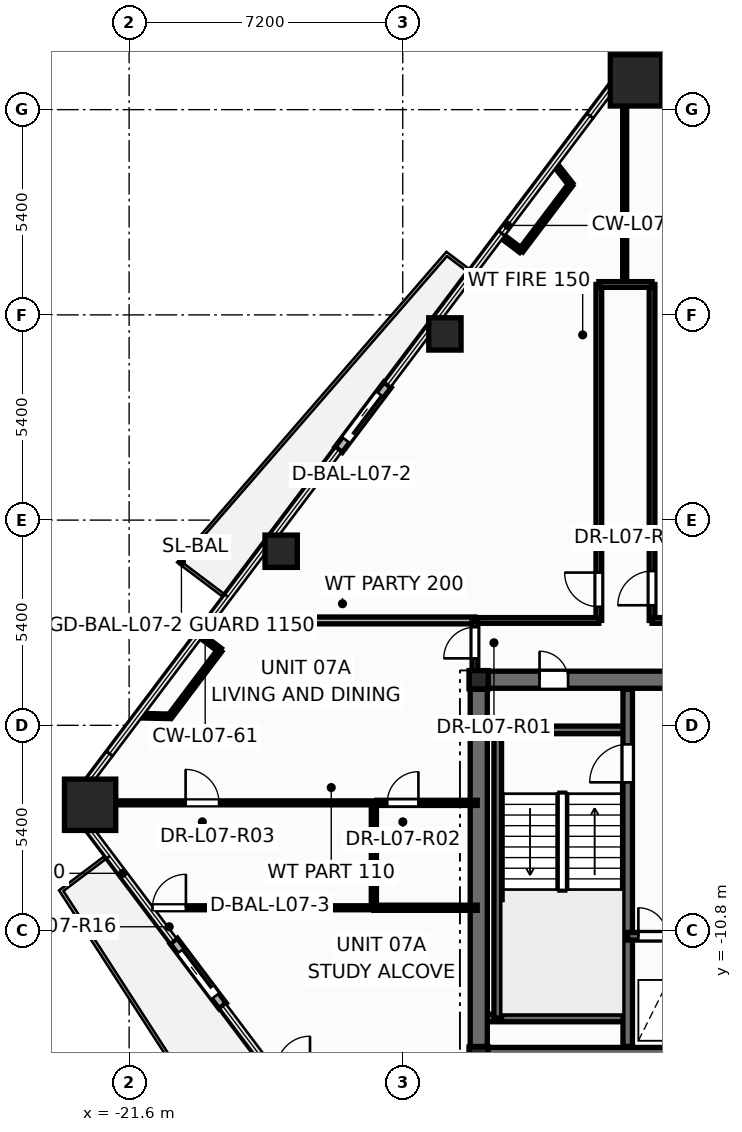
"""IFC4 building model, lengths in metres.
Left out: names, types, materials, properties, quantities, classifications, styles, units other than length and angle.
Written with IfcOpenShell. Run it as: python <this file> out.ifc"""

import sys

from ifc_helpers import new_model, si_unit, direction, frame, frame_2d, origin, origin_2d, place, context, subcontext, project, spatial, rectangle, hollow_rectangle, hollow_circle, i_section, extrude, element, fill, save


model = new_model("IFC4")
c1 = context("Model", 3, precision=1e-05, world=origin(), true_north=direction((0.0, 1.0)))
c2 = subcontext(c1, "Body", "Model", "MODEL_VIEW")
j1 = project(units=[si_unit("LENGTHUNIT", "METRE"), si_unit("PLANEANGLEUNIT", "RADIAN")], contexts=[c1])
p1 = place(None, origin())
s1 = spatial("IfcSite", under=j1, at=p1, CompositionType="ELEMENT")
p2 = place(p1, origin())
s2 = spatial("IfcBuilding", under=s1, at=p2, CompositionType="ELEMENT")
p3 = place(p2, frame((0.0, 0.0, 31.5)))
s3 = spatial("IfcBuildingStorey", under=s2, at=p3, CompositionType="ELEMENT", Elevation=31.5)
for number, where, z_axis, x_axis in (
    (1, (-22.626, -7.49, 0.0), (0.0, 0.0, 1.0), (1.0, 0.0, 0.0)),
    (2, (-8.263, 11.57, 0.0), (0.0, 0.0, 1.0), (1.0, 0.0, 0.0)),
):
    element("IfcColumn", number, at=place(p3, frame(where, z_axis=z_axis, x_axis=x_axis)), inside=s3, PredefinedType="COLUMN", context=c2, shape_type="SweptSolid", body=[
        extrude(hollow_rectangle(XDim=1.35, YDim=1.35, WallThickness=0.065, at=origin_2d()), origin(), (0.0, 0.0, 1.0), 3.6),
    ])
for number, where, z_axis, x_axis in (
    (3, (-13.29, 4.899, 0.0), (0.0, 0.0, 1.0), (1.0, 0.0, 0.0)),
    (4, (-17.599, -0.819, 0.0), (0.0, 0.0, 1.0), (1.0, 0.0, 0.0)),
):
    element("IfcColumn", number, at=place(p3, frame(where, z_axis=z_axis, x_axis=x_axis)), inside=s3, PredefinedType="COLUMN", context=c2, shape_type="SweptSolid", body=[
        extrude(hollow_circle(Radius=0.425, WallThickness=0.038, at=origin_2d()), origin(), (0.0, 0.0, 1.0), 3.6),
    ])
for number, where, z_axis, x_axis in (
    (5, (-12.4, -14.1, 0.0), (0.0, 0.0, 1.0), (1.0, 0.0, 0.0)),
    (6, (-12.4, -4.2, 0.0), (0.0, 0.0, 1.0), (1.0, 0.0, 0.0)),
):
    element("IfcColumn", number, at=place(p3, frame(where, z_axis=z_axis, x_axis=x_axis)), inside=s3, PredefinedType="COLUMN", context=c2, shape_type="SweptSolid", body=[
        extrude(i_section(OverallWidth=0.5, OverallDepth=0.482, WebThickness=0.04, FlangeThickness=0.045, at=origin_2d()), origin(), (0.0, 0.0, 1.0), 3.6),
    ])
p4 = place(p3, frame((-14.8, 3.561, -0.015), z_axis=(0.0, 0.0, 1.0), x_axis=(-0.601823875366, -0.798628839349, 0.0)))
e7 = element("IfcWall", 7, at=p4, inside=s3, PredefinedType="STANDARD", context=c2, shape_type="SweptSolid", body=[
    extrude(rectangle(XDim=2.14, YDim=0.24, at=frame_2d((1.07, 0.0))), origin(), (0.0, 0.0, 1.0), 2.728),
])
p5 = place(p4, frame((0.32, 0.0, 0.015)))
e8 = element("IfcOpeningElement", 8, at=p5, cuts=e7, PredefinedType="OPENING", context=c2, shape_type="SweptSolid", body=[
    extrude(rectangle(XDim=1.506, YDim=2.204, at=frame_2d((0.75, 1.102))), frame((0.0, 0.13, 0.0), z_axis=(0.0, -1.0, 0.0), x_axis=(1.0, 0.0, 0.0)), (0.0, 0.0, 1.0), 0.26),
])
p6 = place(p3, frame((-20.427, -11.073, -0.015), z_axis=(0.0, 0.0, 1.0), x_axis=(0.601769043502, -0.798670156124, 0.0)))
e9 = element("IfcWall", 9, at=p6, inside=s3, PredefinedType="STANDARD", context=c2, shape_type="SweptSolid", body=[
    extrude(rectangle(XDim=2.14, YDim=0.24, at=frame_2d((1.07, 0.0))), origin(), (0.0, 0.0, 1.0), 2.728),
])
p7 = place(p6, frame((0.32, 0.0, 0.015)))
e10 = element("IfcOpeningElement", 10, at=p7, cuts=e9, PredefinedType="OPENING", context=c2, shape_type="SweptSolid", body=[
    extrude(rectangle(XDim=1.506, YDim=2.204, at=frame_2d((0.75, 1.102))), frame((0.0, 0.13, 0.0), z_axis=(0.0, -1.0, 0.0), x_axis=(1.0, 0.0, 0.0)), (0.0, 0.0, 1.0), 0.26),
])
p8 = place(p3, frame((-12.65, -14.1, 0.0), z_axis=(0.0, 0.0, 1.0), x_axis=(1.0, 0.0, 0.0)))
e11 = element("IfcWall", 11, at=p8, inside=s3, PredefinedType="SHEAR", context=c2, shape_type="SweptSolid", body=[
    extrude(rectangle(XDim=25.3, YDim=0.45, at=frame_2d((12.65, 0.0))), origin(), (0.0, 0.0, 1.0), 3.6),
])
p9 = place(p3, frame((-12.65, -4.2, 0.0), z_axis=(0.0, 0.0, 1.0), x_axis=(1.0, 0.0, 0.0)))
e12 = element("IfcWall", 12, at=p9, inside=s3, PredefinedType="SHEAR", context=c2, shape_type="SweptSolid", body=[
    extrude(rectangle(XDim=25.3, YDim=0.45, at=frame_2d((12.65, 0.0))), origin(), (0.0, 0.0, 1.0), 3.6),
])
p10 = place(p9, frame((1.85, 0.0, 0.0)))
e13 = element("IfcOpeningElement", 13, at=p10, cuts=e12, PredefinedType="OPENING", context=c2, shape_type="SweptSolid", body=[
    extrude(rectangle(XDim=0.756, YDim=2.054, at=frame_2d((0.375, 1.027))), frame((0.0, 0.235, 0.0), z_axis=(0.0, -1.0, 0.0), x_axis=(1.0, 0.0, 0.0)), (0.0, 0.0, 1.0), 0.47),
])
p11 = place(p9, frame((21.85, 0.0, 0.0)))
e14 = element("IfcOpeningElement", 14, at=p11, cuts=e12, PredefinedType="OPENING", context=c2, shape_type="SweptSolid", body=[
    extrude(rectangle(XDim=0.756, YDim=2.054, at=frame_2d((0.375, 1.027))), frame((0.0, 0.235, 0.0), z_axis=(0.0, -1.0, 0.0), x_axis=(1.0, 0.0, 0.0)), (0.0, 0.0, 1.0), 0.47),
])
p12 = place(p9, frame((23.5, 0.0, 0.0)))
e15 = element("IfcOpeningElement", 15, at=p12, cuts=e12, PredefinedType="OPENING", context=c2, shape_type="SweptSolid", body=[
    extrude(rectangle(XDim=0.756, YDim=2.054, at=frame_2d((0.375, 1.027))), frame((0.0, 0.235, 0.0), z_axis=(0.0, -1.0, 0.0), x_axis=(1.0, 0.0, 0.0)), (0.0, 0.0, 1.0), 0.47),
])
p13 = place(p9, frame((5.85, 0.0, 0.0)))
e16 = element("IfcOpeningElement", 16, at=p13, cuts=e12, PredefinedType="OPENING", context=c2, shape_type="SweptSolid", body=[
    extrude(rectangle(XDim=1.006, YDim=2.104, at=frame_2d((0.5, 1.052))), frame((0.0, 0.235, 0.0), z_axis=(0.0, -1.0, 0.0), x_axis=(1.0, 0.0, 0.0)), (0.0, 0.0, 1.0), 0.47),
])
p14 = place(p9, frame((10.35, 0.0, 0.0)))
e17 = element("IfcOpeningElement", 17, at=p14, cuts=e12, PredefinedType="OPENING", context=c2, shape_type="SweptSolid", body=[
    extrude(rectangle(XDim=1.406, YDim=2.154, at=frame_2d((0.7, 1.077))), frame((0.0, 0.235, 0.0), z_axis=(0.0, -1.0, 0.0), x_axis=(1.0, 0.0, 0.0)), (0.0, 0.0, 1.0), 0.47),
])
p15 = place(p9, frame((18.45, 0.0, 0.0)))
e18 = element("IfcOpeningElement", 18, at=p15, cuts=e12, PredefinedType="OPENING", context=c2, shape_type="SweptSolid", body=[
    extrude(rectangle(XDim=1.006, YDim=2.104, at=frame_2d((0.5, 1.052))), frame((0.0, 0.235, 0.0), z_axis=(0.0, -1.0, 0.0), x_axis=(1.0, 0.0, 0.0)), (0.0, 0.0, 1.0), 0.47),
])
for number, where, z_axis, x_axis in (
    (19, (-12.35, -5.52, 0.0), (0.0, 0.0, 1.0), (1.0, 0.0, 0.0)),
    (20, (-12.35, -13.1, 0.0), (0.0, 0.0, 1.0), (1.0, 0.0, 0.0)),
):
    element("IfcWall", number, at=place(p3, frame(where, z_axis=z_axis, x_axis=x_axis)), inside=s3, PredefinedType="SOLIDWALL", context=c2, shape_type="SweptSolid", body=[
        extrude(rectangle(XDim=3.87, YDim=0.2, at=frame_2d((1.935, 0.0))), origin(), (0.0, 0.0, 1.0), 3.6),
    ])
p16 = place(p3, frame((-11.9, -13.1, 0.0), z_axis=(0.0, 0.0, 1.0), x_axis=(0.0, 1.0, 0.0)))
e21 = element("IfcWall", 21, at=p16, inside=s3, PredefinedType="SOLIDWALL", context=c2, shape_type="SweptSolid", body=[
    extrude(rectangle(XDim=7.58, YDim=0.2, at=frame_2d((3.79, 0.0))), origin(), (0.0, 0.0, 1.0), 3.6),
])
p17 = place(p3, frame((-8.48, -13.85, 0.0), z_axis=(0.0, 0.0, 1.0), x_axis=(0.0, 1.0, 0.0)))
e22 = element("IfcWall", 22, at=p17, inside=s3, PredefinedType="SHEAR", context=c2, shape_type="SweptSolid", body=[
    extrude(rectangle(XDim=9.4, YDim=0.25, at=frame_2d((4.7, 0.0))), origin(), (0.0, 0.0, 1.0), 3.6),
])
p18 = place(p17, frame((6.95, 0.0, 0.0)))
e23 = element("IfcOpeningElement", 23, at=p18, cuts=e22, PredefinedType="OPENING", context=c2, shape_type="SweptSolid", body=[
    extrude(rectangle(XDim=1.006, YDim=2.104, at=frame_2d((0.5, 1.052))), frame((0.0, 0.135, 0.0), z_axis=(0.0, -1.0, 0.0), x_axis=(1.0, 0.0, 0.0)), (0.0, 0.0, 1.0), 0.27),
])
p19 = place(p3, frame((-8.48, -10.95, 0.0), z_axis=(0.0, 0.0, 1.0), x_axis=(1.0, 0.0, 0.0)))
e24 = element("IfcWall", 24, at=p19, inside=s3, PredefinedType="SOLIDWALL", context=c2, shape_type="SweptSolid", body=[
    extrude(rectangle(XDim=3.36, YDim=0.2, at=frame_2d((1.68, 0.0))), origin(), (0.0, 0.0, 1.0), 3.6),
])
p20 = place(p19, frame((0.28, 0.0, 0.0)))
e25 = element("IfcOpeningElement", 25, at=p20, cuts=e24, PredefinedType="OPENING", context=c2, shape_type="SweptSolid", body=[
    extrude(rectangle(XDim=0.756, YDim=2.054, at=frame_2d((0.375, 1.027))), frame((0.0, 0.11, 0.0), z_axis=(0.0, -1.0, 0.0), x_axis=(1.0, 0.0, 0.0)), (0.0, 0.0, 1.0), 0.22),
])
p21 = place(p19, frame((1.85, 0.0, 0.0)))
e26 = element("IfcOpeningElement", 26, at=p21, cuts=e24, PredefinedType="OPENING", context=c2, shape_type="SweptSolid", body=[
    extrude(rectangle(XDim=1.106, YDim=2.104, at=frame_2d((0.55, 1.052))), frame((0.0, 0.11, 0.0), z_axis=(0.0, -1.0, 0.0), x_axis=(1.0, 0.0, 0.0)), (0.0, 0.0, 1.0), 0.22),
])
p22 = place(p3, frame((-12.4, -13.85, 0.0), z_axis=(0.0, 0.0, 1.0), x_axis=(0.0, 1.0, 0.0)))
e27 = element("IfcWall", 27, at=p22, inside=s3, PredefinedType="SHEAR", context=c2, shape_type="SweptSolid", body=[
    extrude(rectangle(XDim=9.4, YDim=0.45, at=frame_2d((4.7, 0.0))), origin(), (0.0, 0.0, 1.0), 3.6),
])
p23 = place(p3, frame((-9.24, -2.64, 0.0), z_axis=(0.0, 0.0, 1.0), x_axis=(0.0, 1.0, 0.0)))
e28 = element("IfcWall", 28, at=p23, inside=s3, PredefinedType="PARTITIONING", context=c2, shape_type="SweptSolid", body=[
    extrude(rectangle(XDim=8.84, YDim=0.15, at=frame_2d((4.42, 0.0))), origin(), (0.0, 0.0, 1.0), 2.509),
])
p24 = place(p23, frame((0.359, 0.0, 0.0)))
e29 = element("IfcOpeningElement", 29, at=p24, cuts=e28, PredefinedType="OPENING", context=c2, shape_type="SweptSolid", body=[
    extrude(rectangle(XDim=0.906, YDim=2.104, at=frame_2d((0.45, 1.052))), frame((0.0, 0.085, 0.0), z_axis=(0.0, -1.0, 0.0), x_axis=(1.0, 0.0, 0.0)), (0.0, 0.0, 1.0), 0.17),
])
p25 = place(p3, frame((-7.84, -2.64, 0.0), z_axis=(0.0, 0.0, 1.0), x_axis=(0.0, 1.0, 0.0)))
e30 = element("IfcWall", 30, at=p25, inside=s3, PredefinedType="PARTITIONING", context=c2, shape_type="SweptSolid", body=[
    extrude(rectangle(XDim=8.84, YDim=0.15, at=frame_2d((4.42, 0.0))), origin(), (0.0, 0.0, 1.0), 2.509),
])
p26 = place(p25, frame((0.399, 0.0, 0.0)))
e31 = element("IfcOpeningElement", 31, at=p26, cuts=e30, PredefinedType="OPENING", context=c2, shape_type="SweptSolid", body=[
    extrude(rectangle(XDim=0.906, YDim=2.104, at=frame_2d((0.45, 1.052))), frame((0.0, 0.085, 0.0), z_axis=(0.0, -1.0, 0.0), x_axis=(1.0, 0.0, 0.0)), (0.0, 0.0, 1.0), 0.17),
])
p27 = place(p3, frame((-23.089, -7.44, 0.0), z_axis=(0.0, 0.0, 1.0), x_axis=(1.0, 0.0, 0.0)))
e32 = element("IfcWall", 32, at=p27, inside=s3, PredefinedType="PARTITIONING", context=c2, shape_type="SweptSolid", body=[
    extrude(rectangle(XDim=8.009, YDim=0.105, at=frame_2d((4.005, 0.0))), origin(), (0.0, 0.0, 1.0), 2.325),
])
p28 = place(p27, frame((2.976, 0.0, 0.0)))
e33 = element("IfcOpeningElement", 33, at=p28, cuts=e32, PredefinedType="OPENING", context=c2, shape_type="SweptSolid", body=[
    extrude(rectangle(XDim=0.886, YDim=2.104, at=frame_2d((0.44, 1.052))), frame((0.0, 0.062, 0.0), z_axis=(0.0, -1.0, 0.0), x_axis=(1.0, 0.0, 0.0)), (0.0, 0.0, 1.0), 0.125),
])
p29 = place(p3, frame((-19.472, -2.64, 0.0), z_axis=(0.0, 0.0, 1.0), x_axis=(1.0, 0.0, 0.0)))
e34 = element("IfcWall", 34, at=p29, inside=s3, PredefinedType="PARTITIONING", context=c2, shape_type="SweptSolid", body=[
    extrude(rectangle(XDim=6.972, YDim=0.18, at=frame_2d((3.486, 0.0))), origin(), (0.0, 0.0, 1.0), 2.713),
])
p30 = place(p3, frame((-7.84, -2.64, 0.0), z_axis=(0.0, 0.0, 1.0), x_axis=(1.0, 0.0, 0.0)))
e35 = element("IfcWall", 35, at=p30, inside=s3, PredefinedType="PARTITIONING", context=c2, shape_type="SweptSolid", body=[
    extrude(rectangle(XDim=8.578, YDim=0.15, at=frame_2d((4.289, 0.0))), origin(), (0.0, 0.0, 1.0), 2.325),
])
p31 = place(p3, frame((-21.085, -10.2, 0.0), z_axis=(0.0, 0.0, 1.0), x_axis=(1.0, 0.0, 0.0)))
e36 = element("IfcWall", 36, at=p31, inside=s3, PredefinedType="PARTITIONING", context=c2, shape_type="SweptSolid", body=[
    extrude(rectangle(XDim=5.926, YDim=0.105, at=frame_2d((2.963, 0.0))), origin(), (0.0, 0.0, 1.0), 2.713),
])
p32 = place(p31, frame((0.1, 0.0, 0.0)))
e37 = element("IfcOpeningElement", 37, at=p32, cuts=e36, PredefinedType="OPENING", context=c2, shape_type="SweptSolid", body=[
    extrude(rectangle(XDim=0.886, YDim=2.104, at=frame_2d((0.44, 1.052))), frame((0.0, 0.062, 0.0), z_axis=(0.0, -1.0, 0.0), x_axis=(1.0, 0.0, 0.0)), (0.0, 0.0, 1.0), 0.125),
])
p33 = place(p3, frame((-8.56, 6.2, 0.0), z_axis=(0.0, 0.0, 1.0), x_axis=(0.0, 1.0, 0.0)))
e38 = element("IfcWall", 38, at=p33, inside=s3, PredefinedType="PARTITIONING", context=c2, shape_type="SweptSolid", body=[
    extrude(rectangle(XDim=5.641, YDim=0.105, at=frame_2d((2.821, 0.0))), origin(), (0.0, 0.0, 1.0), 2.509),
])
p34 = place(p3, frame((-12.5, -2.64, 0.0), z_axis=(0.0, 0.0, 1.0), x_axis=(1.0, 0.0, 0.0)))
e39 = element("IfcWall", 39, at=p34, inside=s3, PredefinedType="PARTITIONING", context=c2, shape_type="SweptSolid", body=[
    extrude(rectangle(XDim=3.26, YDim=0.15, at=frame_2d((1.63, 0.0))), origin(), (0.0, 0.0, 1.0), 3.35),
])
p35 = place(p3, frame((-15.078, -7.44, 0.0), z_axis=(0.0, 0.0, 1.0), x_axis=(1.0, 0.0, 0.0)))
e40 = element("IfcWall", 40, at=p35, inside=s3, PredefinedType="PARTITIONING", context=c2, shape_type="SweptSolid", body=[
    extrude(rectangle(XDim=2.638, YDim=0.135, at=frame_2d((1.319, 0.0))), origin(), (0.0, 0.0, 1.0), 2.713),
])
p36 = place(p35, frame((0.271, 0.0, 0.0)))
e41 = element("IfcOpeningElement", 41, at=p36, cuts=e40, PredefinedType="OPENING", context=c2, shape_type="SweptSolid", body=[
    extrude(rectangle(XDim=0.826, YDim=2.104, at=frame_2d((0.41, 1.052))), frame((0.0, 0.078, 0.0), z_axis=(0.0, -1.0, 0.0), x_axis=(1.0, 0.0, 0.0)), (0.0, 0.0, 1.0), 0.155),
])
p37 = place(p3, frame((-15.16, -10.2, 0.0), z_axis=(0.0, 0.0, 1.0), x_axis=(0.0, 1.0, 0.0)))
e42 = element("IfcWall", 42, at=p37, inside=s3, PredefinedType="PARTITIONING", context=c2, shape_type="SweptSolid", body=[
    extrude(rectangle(XDim=2.76, YDim=0.135, at=frame_2d((1.38, 0.0))), origin(), (0.0, 0.0, 1.0), 3.35),
])
p38 = place(p3, frame((-15.16, -10.2, 0.0), z_axis=(0.0, 0.0, 1.0), x_axis=(1.0, 0.0, 0.0)))
e43 = element("IfcWall", 43, at=p38, inside=s3, PredefinedType="PARTITIONING", context=c2, shape_type="SweptSolid", body=[
    extrude(rectangle(XDim=2.72, YDim=0.135, at=frame_2d((1.36, 0.0))), origin(), (0.0, 0.0, 1.0), 2.713),
])
for number, where, z_axis, x_axis in (
    (44, (-9.976, 8.833, 0.0), (0.0, 0.0, 1.0), (-0.602, -0.799, 0.0)),
    (45, (-19.21, -3.422, 0.0), (0.0, 0.0, 1.0), (-0.602, -0.799, 0.0)),
):
    element("IfcWall", number, at=place(p3, frame(where, z_axis=z_axis, x_axis=x_axis)), inside=s3, PredefinedType="PARTITIONING", context=c2, shape_type="SweptSolid", body=[
        extrude(rectangle(XDim=2.18, YDim=0.12, at=frame_2d((1.09, 0.0))), origin(), (0.0, 0.0, 1.0), 3.35),
    ])
p39 = place(p3, frame((-12.5, -4.24, 0.0), z_axis=(0.0, 0.0, 1.0), x_axis=(0.0, 1.0, 0.0)))
e46 = element("IfcWall", 46, at=p39, inside=s3, PredefinedType="PARTITIONING", context=c2, shape_type="SweptSolid", body=[
    extrude(rectangle(XDim=1.6, YDim=0.15, at=frame_2d((0.8, 0.0))), origin(), (0.0, 0.0, 1.0), 2.325),
])
p40 = place(p39, frame((0.602, 0.0, 0.0)))
e47 = element("IfcOpeningElement", 47, at=p40, cuts=e46, PredefinedType="OPENING", context=c2, shape_type="SweptSolid", body=[
    extrude(rectangle(XDim=0.826, YDim=2.104, at=frame_2d((0.41, 1.052))), frame((0.0, 0.085, 0.0), z_axis=(0.0, -1.0, 0.0), x_axis=(1.0, 0.0, 0.0)), (0.0, 0.0, 1.0), 0.17),
])
p41 = place(p3, frame((-20.522, -5.163, 0.0), z_axis=(0.0, 0.0, 1.0), x_axis=(-0.999785995621, 0.02068726565, 0.0)))
e48 = element("IfcWall", 48, at=p41, inside=s3, PredefinedType="PARTITIONING", context=c2, shape_type="SweptSolid", body=[
    extrude(rectangle(XDim=0.826, YDim=0.12, at=frame_2d((0.413, 0.0))), origin(), (0.0, 0.0, 1.0), 2.713),
])
p42 = place(p3, frame((-9.24, 6.2, 0.0), z_axis=(0.0, 0.0, 1.0), x_axis=(1.0, 0.0, 0.0)))
e49 = element("IfcWall", 49, at=p42, inside=s3, PredefinedType="PARTITIONING", context=c2, shape_type="SweptSolid", body=[
    extrude(rectangle(XDim=1.4, YDim=0.15, at=frame_2d((0.7, 0.0))), origin(), (0.0, 0.0, 1.0), 3.35),
])
p43 = place(p3, frame((-10.404, 9.377, 0.0), z_axis=(0.0, 0.0, 1.0), x_axis=(0.618661415425, -0.785657720044, 0.0)))
e50 = element("IfcWall", 50, at=p43, inside=s3, PredefinedType="PARTITIONING", context=c2, shape_type="SweptSolid", body=[
    extrude(rectangle(XDim=0.693, YDim=0.12, at=frame_2d((0.346, 0.0))), origin(), (0.0, 0.0, 1.0), 2.713),
])
p44 = place(p3, frame((-11.287, 7.092, 0.0), z_axis=(0.0, 0.0, 1.0), x_axis=(-0.798773936271, 0.601631281379, 0.0)))
e51 = element("IfcWall", 51, at=p44, inside=s3, PredefinedType="PARTITIONING", context=c2, shape_type="SweptSolid", body=[
    extrude(rectangle(XDim=0.67, YDim=0.12, at=frame_2d((0.335, 0.0))), origin(), (0.0, 0.0, 1.0), 2.713),
])
p45 = place(p3, frame((-19.745, -3.019, 0.0), z_axis=(0.0, 0.0, 1.0), x_axis=(0.798598820081, -0.601863709294, 0.0)))
e52 = element("IfcWall", 52, at=p45, inside=s3, PredefinedType="PARTITIONING", context=c2, shape_type="SweptSolid", body=[
    extrude(rectangle(XDim=0.67, YDim=0.12, at=frame_2d((0.335, 0.0))), origin(), (0.0, 0.0, 1.0), 2.713),
])
p46 = place(p5, origin())
e53 = element("IfcDoor", 53, at=p46, inside=s3, OperationType="SLIDING_TO_RIGHT", PredefinedType="DOOR", context=c2, shape_type="SweptSolid", body=[
    extrude(rectangle(XDim=1.5, YDim=2.2, at=frame_2d((0.75, 1.1))), frame((0.0, 0.025, 0.0), z_axis=(0.0, -1.0, 0.0), x_axis=(1.0, 0.0, 0.0)), (0.0, 0.0, 1.0), 0.05),
])
fill(e8, e53)
p47 = place(p7, origin())
e54 = element("IfcDoor", 54, at=p47, inside=s3, OperationType="SLIDING_TO_RIGHT", PredefinedType="DOOR", context=c2, shape_type="SweptSolid", body=[
    extrude(rectangle(XDim=1.5, YDim=2.2, at=frame_2d((0.75, 1.1))), frame((0.0, 0.025, 0.0), z_axis=(0.0, -1.0, 0.0), x_axis=(1.0, 0.0, 0.0)), (0.0, 0.0, 1.0), 0.05),
])
fill(e10, e54)
p48 = place(p18, origin())
e55 = element("IfcDoor", 55, at=p48, inside=s3, OperationType="SINGLE_SWING_LEFT", PredefinedType="DOOR", context=c2, shape_type="SweptSolid", body=[
    extrude(rectangle(XDim=1.0, YDim=2.1, at=frame_2d((0.5, 1.05))), frame((0.0, 0.025, 0.0), z_axis=(0.0, -1.0, 0.0), x_axis=(1.0, 0.0, 0.0)), (0.0, 0.0, 1.0), 0.05),
])
fill(e23, e55)
p49 = place(p20, origin())
e56 = element("IfcDoor", 56, at=p49, inside=s3, OperationType="SINGLE_SWING_LEFT", PredefinedType="DOOR", context=c2, shape_type="SweptSolid", body=[
    extrude(rectangle(XDim=0.75, YDim=2.05, at=frame_2d((0.375, 1.025))), frame((0.0, 0.025, 0.0), z_axis=(0.0, -1.0, 0.0), x_axis=(1.0, 0.0, 0.0)), (0.0, 0.0, 1.0), 0.05),
])
fill(e25, e56)
p50 = place(p10, origin())
e57 = element("IfcDoor", 57, at=p50, inside=s3, OperationType="SINGLE_SWING_LEFT", PredefinedType="DOOR", context=c2, shape_type="SweptSolid", body=[
    extrude(rectangle(XDim=0.75, YDim=2.05, at=frame_2d((0.375, 1.025))), frame((0.0, 0.025, 0.0), z_axis=(0.0, -1.0, 0.0), x_axis=(1.0, 0.0, 0.0)), (0.0, 0.0, 1.0), 0.05),
])
fill(e13, e57)
p51 = place(p40, origin())
e58 = element("IfcDoor", 58, at=p51, inside=s3, OperationType="SINGLE_SWING_LEFT", PredefinedType="DOOR", context=c2, shape_type="SweptSolid", body=[
    extrude(rectangle(XDim=0.82, YDim=2.1, at=frame_2d((0.41, 1.05))), frame((0.0, 0.025, 0.0), z_axis=(0.0, -1.0, 0.0), x_axis=(1.0, 0.0, 0.0)), (0.0, 0.0, 1.0), 0.05),
])
fill(e47, e58)
p52 = place(p36, origin())
e59 = element("IfcDoor", 59, at=p52, inside=s3, OperationType="SINGLE_SWING_RIGHT", PredefinedType="DOOR", context=c2, shape_type="SweptSolid", body=[
    extrude(rectangle(XDim=0.82, YDim=2.1, at=frame_2d((0.41, 1.05))), frame((0.0, 0.025, 0.0), z_axis=(0.0, -1.0, 0.0), x_axis=(1.0, 0.0, 0.0)), (0.0, 0.0, 1.0), 0.05),
])
fill(e41, e59)
p53 = place(p28, origin())
e60 = element("IfcDoor", 60, at=p53, inside=s3, OperationType="SINGLE_SWING_LEFT", PredefinedType="DOOR", context=c2, shape_type="SweptSolid", body=[
    extrude(rectangle(XDim=0.88, YDim=2.1, at=frame_2d((0.44, 1.05))), frame((0.0, 0.025, 0.0), z_axis=(0.0, -1.0, 0.0), x_axis=(1.0, 0.0, 0.0)), (0.0, 0.0, 1.0), 0.05),
])
fill(e33, e60)
p54 = place(p24, origin())
e61 = element("IfcDoor", 61, at=p54, inside=s3, OperationType="SINGLE_SWING_RIGHT", PredefinedType="DOOR", context=c2, shape_type="SweptSolid", body=[
    extrude(rectangle(XDim=0.9, YDim=2.1, at=frame_2d((0.45, 1.05))), frame((0.0, 0.025, 0.0), z_axis=(0.0, -1.0, 0.0), x_axis=(1.0, 0.0, 0.0)), (0.0, 0.0, 1.0), 0.05),
])
fill(e29, e61)
p55 = place(p26, origin())
e62 = element("IfcDoor", 62, at=p55, inside=s3, OperationType="SINGLE_SWING_LEFT", PredefinedType="DOOR", context=c2, shape_type="SweptSolid", body=[
    extrude(rectangle(XDim=0.9, YDim=2.1, at=frame_2d((0.45, 1.05))), frame((0.0, 0.025, 0.0), z_axis=(0.0, -1.0, 0.0), x_axis=(1.0, 0.0, 0.0)), (0.0, 0.0, 1.0), 0.05),
])
fill(e31, e62)
p56 = place(p32, origin())
e63 = element("IfcDoor", 63, at=p56, inside=s3, OperationType="SINGLE_SWING_RIGHT", PredefinedType="DOOR", context=c2, shape_type="SweptSolid", body=[
    extrude(rectangle(XDim=0.88, YDim=2.1, at=frame_2d((0.44, 1.05))), frame((0.0, 0.025, 0.0), z_axis=(0.0, -1.0, 0.0), x_axis=(1.0, 0.0, 0.0)), (0.0, 0.0, 1.0), 0.05),
])
fill(e37, e63)
save(model, sys.argv[1])
